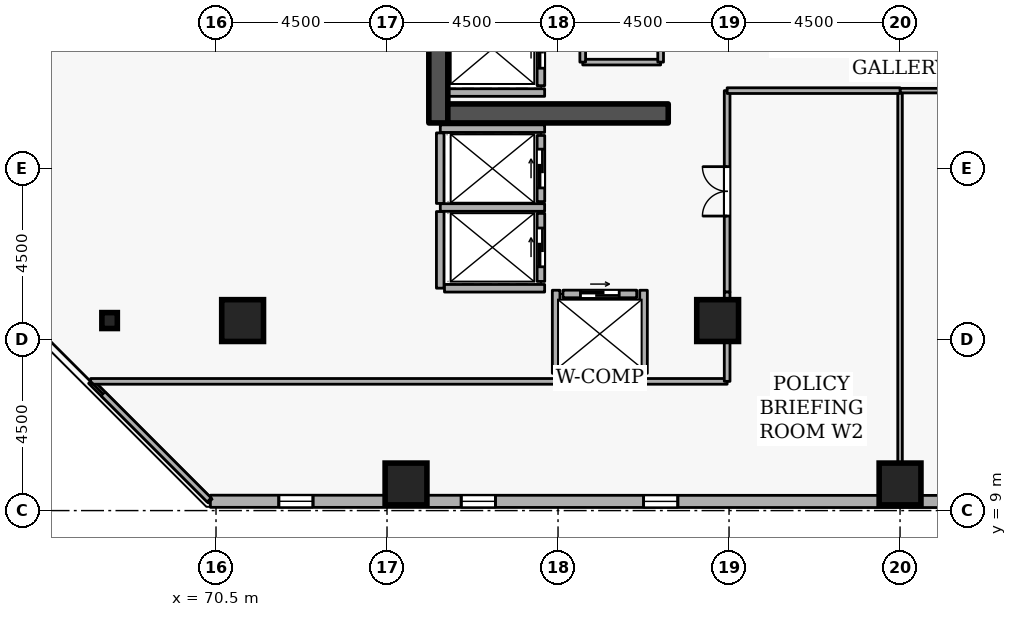
"""IFC4 building model, lengths in metres.
Left out: names, types, materials, properties, quantities, classifications, styles, units other than length and angle.
Written with IfcOpenShell. Run it as: python <this file> out.ifc"""

import sys

from ifc_helpers import new_model, si_unit, direction, frame, frame_2d, origin, origin_2d, place, context, subcontext, project, spatial, rectangle, i_section, extrude, element, fill, save


model = new_model("IFC4")
c1 = context("Model", 3, precision=1e-05, world=origin(), true_north=direction((0.0, 1.0)))
c2 = subcontext(c1, "Body", "Model", "MODEL_VIEW")
j1 = project(units=[si_unit("LENGTHUNIT", "METRE"), si_unit("PLANEANGLEUNIT", "RADIAN")], contexts=[c1])
p1 = place(None, origin())
s1 = spatial("IfcSite", under=j1, at=p1, CompositionType="ELEMENT")
p2 = place(p1, origin())
s2 = spatial("IfcBuilding", under=s1, at=p2, CompositionType="ELEMENT")
p3 = place(p2, frame((0.0, 0.0, 182.1)))
s3 = spatial("IfcBuildingStorey", under=s2, at=p3, CompositionType="ELEMENT", Elevation=182.1)
p4 = place(p3, frame((76.35, 19.2, 0.0), z_axis=(0.0, 0.0, 1.0), x_axis=(0.0, 1.0, 0.0)))
e1 = element("IfcWall", 1, at=p4, inside=s3, PredefinedType="SHEAR", context=c2, shape_type="SweptSolid", body=[
    extrude(rectangle(XDim=15.6, YDim=0.5, at=frame_2d((7.8, 0.0))), origin(), (0.0, 0.0, 1.0), 3.6),
])
p5 = place(p3, frame((76.6, 19.45, 0.0), z_axis=(0.0, 0.0, 1.0), x_axis=(1.0, 0.0, 0.0)))
e2 = element("IfcWall", 2, at=p5, inside=s3, PredefinedType="SHEAR", context=c2, shape_type="SweptSolid", body=[
    extrude(rectangle(XDim=5.8, YDim=0.5, at=frame_2d((2.9, 0.0))), origin(), (0.0, 0.0, 1.0), 3.6),
])
for number, where, z_axis, x_axis in (
    (3, (71.2, 14.0, 0.0), (0.0, 0.0, 1.0), (1.0, 0.0, 0.0)),
    (4, (88.5, 9.7, 0.0), (0.0, 0.0, 1.0), (1.0, 0.0, 0.0)),
    (5, (75.5, 9.7, 0.0), (0.0, 0.0, 1.0), (1.0, 0.0, 0.0)),
    (6, (83.7, 14.0, 0.0), (0.0, 0.0, 1.0), (1.0, 0.0, 0.0)),
):
    element("IfcColumn", number, at=place(p3, frame(where, z_axis=z_axis, x_axis=x_axis)), inside=s3, PredefinedType="COLUMN", context=c2, shape_type="SweptSolid", body=[
        extrude(rectangle(XDim=1.1, YDim=1.1, at=origin_2d()), origin(), (0.0, 0.0, 1.0), 3.6),
    ])
p6 = place(p3, frame((67.7, 14.0, 0.0), z_axis=(0.0, 0.0, 1.0), x_axis=(1.0, 0.0, 0.0)))
e7 = element("IfcColumn", 7, at=p6, inside=s3, PredefinedType="COLUMN", context=c2, shape_type="SweptSolid", body=[
    extrude(i_section(OverallWidth=0.407, OverallDepth=0.419, WebThickness=0.031, FlangeThickness=0.049, FilletRadius=0.015, at=origin_2d()), origin(), (0.0, 0.0, 1.0), 3.6),
])
p7 = place(p3, frame((70.352, 9.245, 0.0), z_axis=(0.0, 0.0, 1.0), x_axis=(0.999999954901, -0.000300328883, 0.0)))
e8 = element("IfcWall", 8, at=p7, inside=s3, PredefinedType="STANDARD", context=c2, shape_type="SweptSolid", body=[
    extrude(rectangle(XDim=33.329, YDim=0.32, at=frame_2d((16.665, 0.0))), origin(), (0.0, 0.0, 1.0), 2.7),
])
p8 = place(p7, frame((1.8, 0.0, 0.72)))
e9 = element("IfcOpeningElement", 9, at=p8, cuts=e8, PredefinedType="OPENING", context=c2, shape_type="SweptSolid", body=[
    extrude(rectangle(XDim=0.9, YDim=1.75, at=frame_2d((0.45, 0.875))), frame((0.0, 0.17, 0.0), z_axis=(0.0, -1.0, 0.0), x_axis=(1.0, 0.0, 0.0)), (0.0, 0.0, 1.0), 0.34),
])
p9 = place(p7, frame((6.6, 0.0, 0.72)))
e10 = element("IfcOpeningElement", 10, at=p9, cuts=e8, PredefinedType="OPENING", context=c2, shape_type="SweptSolid", body=[
    extrude(rectangle(XDim=0.9, YDim=1.75, at=frame_2d((0.45, 0.875))), frame((0.0, 0.17, 0.0), z_axis=(0.0, -1.0, 0.0), x_axis=(1.0, 0.0, 0.0)), (0.0, 0.0, 1.0), 0.34),
])
p10 = place(p7, frame((11.4, 0.0, 0.72)))
e11 = element("IfcOpeningElement", 11, at=p10, cuts=e8, PredefinedType="OPENING", context=c2, shape_type="SweptSolid", body=[
    extrude(rectangle(XDim=0.9, YDim=1.75, at=frame_2d((0.45, 0.875))), frame((0.0, 0.17, 0.0), z_axis=(0.0, -1.0, 0.0), x_axis=(1.0, 0.0, 0.0)), (0.0, 0.0, 1.0), 0.34),
])
p11 = place(p7, frame((21.0, 0.0, 0.72)))
e12 = element("IfcOpeningElement", 12, at=p11, cuts=e8, PredefinedType="OPENING", context=c2, shape_type="SweptSolid", body=[
    extrude(rectangle(XDim=0.9, YDim=1.75, at=frame_2d((0.45, 0.875))), frame((0.0, 0.17, 0.0), z_axis=(0.0, -1.0, 0.0), x_axis=(1.0, 0.0, 0.0)), (0.0, 0.0, 1.0), 0.34),
])
p12 = place(p7, frame((25.8, 0.0, 0.72)))
e13 = element("IfcOpeningElement", 13, at=p12, cuts=e8, PredefinedType="OPENING", context=c2, shape_type="SweptSolid", body=[
    extrude(rectangle(XDim=0.9, YDim=1.75, at=frame_2d((0.45, 0.875))), frame((0.0, 0.17, 0.0), z_axis=(0.0, -1.0, 0.0), x_axis=(1.0, 0.0, 0.0)), (0.0, 0.0, 1.0), 0.34),
])
p13 = place(p3, frame((79.05, 20.18, 0.0), z_axis=(0.0, 0.0, 1.0), x_axis=(0.0, 1.0, 0.0)))
e14 = element("IfcWall", 14, at=p13, inside=s3, PredefinedType="STANDARD", context=c2, shape_type="SweptSolid", body=[
    extrude(rectangle(XDim=1.94, YDim=0.2, at=frame_2d((0.97, 0.0))), origin(), (0.0, 0.0, 1.0), 3.34),
])
p14 = place(p13, frame((0.46, 0.0, 0.0)))
e15 = element("IfcOpeningElement", 15, at=p14, cuts=e14, PredefinedType="OPENING", context=c2, shape_type="SweptSolid", body=[
    extrude(rectangle(XDim=1.02, YDim=2.06, at=frame_2d((0.51, 1.03))), frame((0.0, 0.11, 0.0), z_axis=(0.0, -1.0, 0.0), x_axis=(1.0, 0.0, 0.0)), (0.0, 0.0, 1.0), 0.22),
])
p15 = place(p3, frame((79.05, 17.13, 0.0), z_axis=(0.0, 0.0, 1.0), x_axis=(0.0, 1.0, 0.0)))
e16 = element("IfcWall", 16, at=p15, inside=s3, PredefinedType="STANDARD", context=c2, shape_type="SweptSolid", body=[
    extrude(rectangle(XDim=1.74, YDim=0.2, at=frame_2d((0.87, 0.0))), origin(), (0.0, 0.0, 1.0), 3.34),
])
p16 = place(p15, frame((0.36, 0.0, 0.0)))
e17 = element("IfcOpeningElement", 17, at=p16, cuts=e16, PredefinedType="OPENING", context=c2, shape_type="SweptSolid", body=[
    extrude(rectangle(XDim=1.02, YDim=2.06, at=frame_2d((0.51, 1.03))), frame((0.0, 0.11, 0.0), z_axis=(0.0, -1.0, 0.0), x_axis=(1.0, 0.0, 0.0)), (0.0, 0.0, 1.0), 0.22),
])
p17 = place(p3, frame((79.05, 15.03, 0.0), z_axis=(0.0, 0.0, 1.0), x_axis=(0.0, 1.0, 0.0)))
e18 = element("IfcWall", 18, at=p17, inside=s3, PredefinedType="STANDARD", context=c2, shape_type="SweptSolid", body=[
    extrude(rectangle(XDim=1.79, YDim=0.2, at=frame_2d((0.895, 0.0))), origin(), (0.0, 0.0, 1.0), 3.34),
])
p18 = place(p17, frame((0.385, 0.0, 0.0)))
e19 = element("IfcOpeningElement", 19, at=p18, cuts=e18, PredefinedType="OPENING", context=c2, shape_type="SweptSolid", body=[
    extrude(rectangle(XDim=1.02, YDim=2.06, at=frame_2d((0.51, 1.03))), frame((0.0, 0.11, 0.0), z_axis=(0.0, -1.0, 0.0), x_axis=(1.0, 0.0, 0.0)), (0.0, 0.0, 1.0), 0.22),
])
p19 = place(p3, frame((79.63, 14.7, 0.0), z_axis=(0.0, 0.0, 1.0), x_axis=(1.0, 0.0, 0.0)))
e20 = element("IfcWall", 20, at=p19, inside=s3, PredefinedType="STANDARD", context=c2, shape_type="SweptSolid", body=[
    extrude(rectangle(XDim=1.94, YDim=0.2, at=frame_2d((0.97, 0.0))), origin(), (0.0, 0.0, 1.0), 3.34),
])
p20 = place(p19, frame((0.46, 0.0, 0.0)))
e21 = element("IfcOpeningElement", 21, at=p20, cuts=e20, PredefinedType="OPENING", context=c2, shape_type="SweptSolid", body=[
    extrude(rectangle(XDim=1.02, YDim=2.06, at=frame_2d((0.51, 1.03))), frame((0.0, 0.11, 0.0), z_axis=(0.0, -1.0, 0.0), x_axis=(1.0, 0.0, 0.0)), (0.0, 0.0, 1.0), 0.22),
])
p21 = place(p3, frame((76.612, 20.0, 0.0), z_axis=(0.0, 0.0, 1.0), x_axis=(1.0, 0.0, 0.0)))
e22 = element("IfcWall", 22, at=p21, inside=s3, PredefinedType="STANDARD", context=c2, shape_type="SweptSolid", body=[
    extrude(rectangle(XDim=2.536, YDim=0.2, at=frame_2d((1.268, 0.0))), origin(), (0.0, 0.0, 1.0), 3.34),
])
p22 = place(p3, frame((76.402, 19.05, 0.0), z_axis=(0.0, 0.0, 1.0), x_axis=(1.0, 0.0, 0.0)))
e23 = element("IfcWall", 23, at=p22, inside=s3, PredefinedType="STANDARD", context=c2, shape_type="SweptSolid", body=[
    extrude(rectangle(XDim=2.746, YDim=0.2, at=frame_2d((1.373, 0.0))), origin(), (0.0, 0.0, 1.0), 2.545),
])
p23 = place(p3, frame((76.402, 16.975, 0.0), z_axis=(0.0, 0.0, 1.0), x_axis=(1.0, 0.0, 0.0)))
e24 = element("IfcWall", 24, at=p23, inside=s3, PredefinedType="STANDARD", context=c2, shape_type="SweptSolid", body=[
    extrude(rectangle(XDim=2.746, YDim=0.2, at=frame_2d((1.373, 0.0))), origin(), (0.0, 0.0, 1.0), 3.34),
])
p24 = place(p3, frame((76.4, 14.852, 0.0), z_axis=(0.0, 0.0, 1.0), x_axis=(0.0, 1.0, 0.0)))
e25 = element("IfcWall", 25, at=p24, inside=s3, PredefinedType="STANDARD", context=c2, shape_type="SweptSolid", body=[
    extrude(rectangle(XDim=2.016, YDim=0.2, at=frame_2d((1.008, 0.0))), origin(), (0.0, 0.0, 1.0), 3.34),
])
p25 = place(p3, frame((76.4, 17.082, 0.0), z_axis=(0.0, 0.0, 1.0), x_axis=(0.0, 1.0, 0.0)))
e26 = element("IfcWall", 26, at=p25, inside=s3, PredefinedType="STANDARD", context=c2, shape_type="SweptSolid", body=[
    extrude(rectangle(XDim=1.856, YDim=0.2, at=frame_2d((0.928, 0.0))), origin(), (0.0, 0.0, 1.0), 3.34),
])
p26 = place(p3, frame((76.512, 14.85, 0.0), z_axis=(0.0, 0.0, 1.0), x_axis=(1.0, 0.0, 0.0)))
e27 = element("IfcWall", 27, at=p26, inside=s3, PredefinedType="STANDARD", context=c2, shape_type="SweptSolid", body=[
    extrude(rectangle(XDim=2.636, YDim=0.2, at=frame_2d((1.318, 0.0))), origin(), (0.0, 0.0, 1.0), 3.34),
])
p27 = place(p3, frame((79.452, 12.5, 0.0), z_axis=(0.0, 0.0, 1.0), x_axis=(1.0, 0.0, 0.0)))
e28 = element("IfcWall", 28, at=p27, inside=s3, PredefinedType="STANDARD", context=c2, shape_type="SweptSolid", body=[
    extrude(rectangle(XDim=2.296, YDim=0.2, at=frame_2d((1.148, 0.0))), origin(), (0.0, 0.0, 1.0), 3.34),
])
for number, where, z_axis, x_axis in (
    (29, (81.75, 12.612, 0.0), (0.0, 0.0, 1.0), (0.0, 1.0, 0.0)),
    (30, (79.45, 12.612, 0.0), (0.0, 0.0, 1.0), (0.0, 1.0, 0.0)),
):
    element("IfcWall", number, at=place(p3, frame(where, z_axis=z_axis, x_axis=x_axis)), inside=s3, PredefinedType="STANDARD", context=c2, shape_type="SweptSolid", body=[
        extrude(rectangle(XDim=2.186, YDim=0.2, at=frame_2d((1.093, 0.0))), origin(), (0.0, 0.0, 1.0), 3.34),
    ])
p28 = place(p3, frame((82.2, 20.8, 0.0), z_axis=(0.0, 0.0, 1.0), x_axis=(-1.0, 0.0, 0.0)))
e31 = element("IfcWall", 31, at=p28, inside=s3, PredefinedType="PARTITIONING", context=c2, shape_type="SweptSolid", body=[
    extrude(rectangle(XDim=2.05, YDim=0.15, at=frame_2d((1.025, 0.0))), origin(), (0.0, 0.0, 1.0), 3.34),
])
p29 = place(p3, frame((80.15, 20.8, 0.0), z_axis=(0.0, 0.0, 1.0), x_axis=(0.0, 1.0, 0.0)))
e32 = element("IfcWall", 32, at=p29, inside=s3, PredefinedType="PARTITIONING", context=c2, shape_type="SweptSolid", body=[
    extrude(rectangle(XDim=3.25, YDim=0.15, at=frame_2d((1.625, 0.0))), origin(), (0.0, 0.0, 1.0), 3.34),
])
p30 = place(p3, frame((82.2, 24.05, 0.0), z_axis=(0.0, 0.0, 1.0), x_axis=(0.0, -1.0, 0.0)))
e33 = element("IfcWall", 33, at=p30, inside=s3, PredefinedType="PARTITIONING", context=c2, shape_type="SweptSolid", body=[
    extrude(rectangle(XDim=3.25, YDim=0.15, at=frame_2d((1.625, 0.0))), origin(), (0.0, 0.0, 1.0), 3.34),
])
p31 = place(p30, frame((1.165, 0.0, 0.0)))
e34 = element("IfcOpeningElement", 34, at=p31, cuts=e33, PredefinedType="OPENING", context=c2, shape_type="SweptSolid", body=[
    extrude(rectangle(XDim=0.92, YDim=2.08, at=frame_2d((0.46, 1.04))), frame((0.0, 0.085, 0.0), z_axis=(0.0, -1.0, 0.0), x_axis=(1.0, 0.0, 0.0)), (0.0, 0.0, 1.0), 0.17),
])
p32 = place(p3, frame((88.5, 9.28, 0.0), z_axis=(0.0, 0.0, 1.0), x_axis=(0.0, 1.0, 0.0)))
e35 = element("IfcWall", 35, at=p32, inside=s3, PredefinedType="PARTITIONING", context=c2, shape_type="SweptSolid", body=[
    extrude(rectangle(XDim=10.77, YDim=0.12, at=frame_2d((5.385, 0.0))), origin(), (0.0, 0.0, 1.0), 2.932),
])
p33 = place(p3, frame((88.5, 20.05, 0.0), z_axis=(0.0, 0.0, 1.0), x_axis=(1.0, 0.0, 0.0)))
e36 = element("IfcWall", 36, at=p33, inside=s3, PredefinedType="PARTITIONING", context=c2, shape_type="SweptSolid", body=[
    extrude(rectangle(XDim=4.55, YDim=0.12, at=frame_2d((2.275, 0.0))), origin(), (0.0, 0.0, 1.0), 3.34),
])
p34 = place(p3, frame((83.95, 14.75, 0.0), z_axis=(0.0, 0.0, 1.0), x_axis=(0.0, 1.0, 0.0)))
e37 = element("IfcWall", 37, at=p34, inside=s3, PredefinedType="PARTITIONING", context=c2, shape_type="SweptSolid", body=[
    extrude(rectangle(XDim=5.3, YDim=0.15, at=frame_2d((2.65, 0.0))), origin(), (0.0, 0.0, 1.0), 3.34),
])
p35 = place(p34, frame((2.0, 0.0, 0.0)))
e38 = element("IfcOpeningElement", 38, at=p35, cuts=e37, PredefinedType="OPENING", context=c2, shape_type="SweptSolid", body=[
    extrude(rectangle(XDim=1.3, YDim=2.12, at=frame_2d((0.65, 1.06))), frame((0.0, 0.085, 0.0), z_axis=(0.0, -1.0, 0.0), x_axis=(1.0, 0.0, 0.0)), (0.0, 0.0, 1.0), 0.17),
])
p36 = place(p3, frame((83.95, 20.05, 0.0), z_axis=(0.0, 0.0, 1.0), x_axis=(1.0, 0.0, 0.0)))
e39 = element("IfcWall", 39, at=p36, inside=s3, PredefinedType="PARTITIONING", context=c2, shape_type="SweptSolid", body=[
    extrude(rectangle(XDim=4.55, YDim=0.15, at=frame_2d((2.275, 0.0))), origin(), (0.0, 0.0, 1.0), 3.34),
])
p37 = place(p3, frame((70.321, 9.28, 0.0), z_axis=(0.0, 0.0, 1.0), x_axis=(-0.707106781187, 0.707106781187, 0.0)))
e40 = element("IfcWall", 40, at=p37, inside=s3, PredefinedType="PARTITIONING", context=c2, shape_type="SweptSolid", body=[
    extrude(rectangle(XDim=4.412, YDim=0.15, at=frame_2d((2.206, 0.0))), origin(), (0.0, 0.0, 1.0), 3.34),
])
p38 = place(p3, frame((67.201, 12.4, 0.0), z_axis=(0.0, 0.0, 1.0), x_axis=(1.0, 0.0, 0.0)))
e41 = element("IfcWall", 41, at=p38, inside=s3, PredefinedType="PARTITIONING", context=c2, shape_type="SweptSolid", body=[
    extrude(rectangle(XDim=12.251, YDim=0.15, at=frame_2d((6.125, 0.0))), origin(), (0.0, 0.0, 1.0), 3.34),
])
p39 = place(p3, frame((81.748, 12.4, 0.0), z_axis=(0.0, 0.0, 1.0), x_axis=(1.0, 0.0, 0.0)))
e42 = element("IfcWall", 42, at=p39, inside=s3, PredefinedType="PARTITIONING", context=c2, shape_type="SweptSolid", body=[
    extrude(rectangle(XDim=2.202, YDim=0.15, at=frame_2d((1.101, 0.0))), origin(), (0.0, 0.0, 1.0), 3.34),
])
p40 = place(p3, frame((83.95, 12.4, 0.0), z_axis=(0.0, 0.0, 1.0), x_axis=(0.0, 1.0, 0.0)))
e43 = element("IfcWall", 43, at=p40, inside=s3, PredefinedType="PARTITIONING", context=c2, shape_type="SweptSolid", body=[
    extrude(rectangle(XDim=2.35, YDim=0.15, at=frame_2d((1.175, 0.0))), origin(), (0.0, 0.0, 1.0), 3.34),
])
p41 = place(p8, origin())
e44 = element("IfcWindow", 44, at=p41, inside=s3, PartitioningType="SINGLE_PANEL", PredefinedType="WINDOW", context=c2, shape_type="SweptSolid", body=[
    extrude(rectangle(XDim=0.9, YDim=1.75, at=frame_2d((0.45, 0.875))), frame((0.0, 0.03, 0.0), z_axis=(0.0, -1.0, 0.0), x_axis=(1.0, 0.0, 0.0)), (0.0, 0.0, 1.0), 0.06),
])
fill(e9, e44)
p42 = place(p9, origin())
e45 = element("IfcWindow", 45, at=p42, inside=s3, PartitioningType="SINGLE_PANEL", PredefinedType="WINDOW", context=c2, shape_type="SweptSolid", body=[
    extrude(rectangle(XDim=0.9, YDim=1.75, at=frame_2d((0.45, 0.875))), frame((0.0, 0.03, 0.0), z_axis=(0.0, -1.0, 0.0), x_axis=(1.0, 0.0, 0.0)), (0.0, 0.0, 1.0), 0.06),
])
fill(e10, e45)
p43 = place(p10, origin())
e46 = element("IfcWindow", 46, at=p43, inside=s3, PartitioningType="SINGLE_PANEL", PredefinedType="WINDOW", context=c2, shape_type="SweptSolid", body=[
    extrude(rectangle(XDim=0.9, YDim=1.75, at=frame_2d((0.45, 0.875))), frame((0.0, 0.03, 0.0), z_axis=(0.0, -1.0, 0.0), x_axis=(1.0, 0.0, 0.0)), (0.0, 0.0, 1.0), 0.06),
])
fill(e11, e46)
p44 = place(p14, origin())
e47 = element("IfcDoor", 47, at=p44, inside=s3, OperationType="SLIDING_TO_LEFT", PredefinedType="DOOR", context=c2, shape_type="SweptSolid", body=[
    extrude(rectangle(XDim=1.02, YDim=2.06, at=frame_2d((0.51, 1.03))), frame((0.0, 0.025, 0.0), z_axis=(0.0, -1.0, 0.0), x_axis=(1.0, 0.0, 0.0)), (0.0, 0.0, 1.0), 0.05),
])
fill(e15, e47)
p45 = place(p16, origin())
e48 = element("IfcDoor", 48, at=p45, inside=s3, OperationType="SLIDING_TO_LEFT", PredefinedType="DOOR", context=c2, shape_type="SweptSolid", body=[
    extrude(rectangle(XDim=1.02, YDim=2.06, at=frame_2d((0.51, 1.03))), frame((0.0, 0.025, 0.0), z_axis=(0.0, -1.0, 0.0), x_axis=(1.0, 0.0, 0.0)), (0.0, 0.0, 1.0), 0.05),
])
fill(e17, e48)
p46 = place(p18, origin())
e49 = element("IfcDoor", 49, at=p46, inside=s3, OperationType="SLIDING_TO_LEFT", PredefinedType="DOOR", context=c2, shape_type="SweptSolid", body=[
    extrude(rectangle(XDim=1.02, YDim=2.06, at=frame_2d((0.51, 1.03))), frame((0.0, 0.025, 0.0), z_axis=(0.0, -1.0, 0.0), x_axis=(1.0, 0.0, 0.0)), (0.0, 0.0, 1.0), 0.05),
])
fill(e19, e49)
p47 = place(p20, origin())
e50 = element("IfcDoor", 50, at=p47, inside=s3, OperationType="SLIDING_TO_LEFT", PredefinedType="DOOR", context=c2, shape_type="SweptSolid", body=[
    extrude(rectangle(XDim=1.02, YDim=2.06, at=frame_2d((0.51, 1.03))), frame((0.0, 0.025, 0.0), z_axis=(0.0, -1.0, 0.0), x_axis=(1.0, 0.0, 0.0)), (0.0, 0.0, 1.0), 0.05),
])
fill(e21, e50)
p48 = place(p35, origin())
e51 = element("IfcDoor", 51, at=p48, inside=s3, OperationType="DOUBLE_DOOR_SINGLE_SWING", PredefinedType="DOOR", context=c2, shape_type="SweptSolid", body=[
    extrude(rectangle(XDim=1.3, YDim=2.12, at=frame_2d((0.65, 1.06))), frame((0.0, 0.025, 0.0), z_axis=(0.0, -1.0, 0.0), x_axis=(1.0, 0.0, 0.0)), (0.0, 0.0, 1.0), 0.05),
])
fill(e38, e51)
save(model, sys.argv[1])
